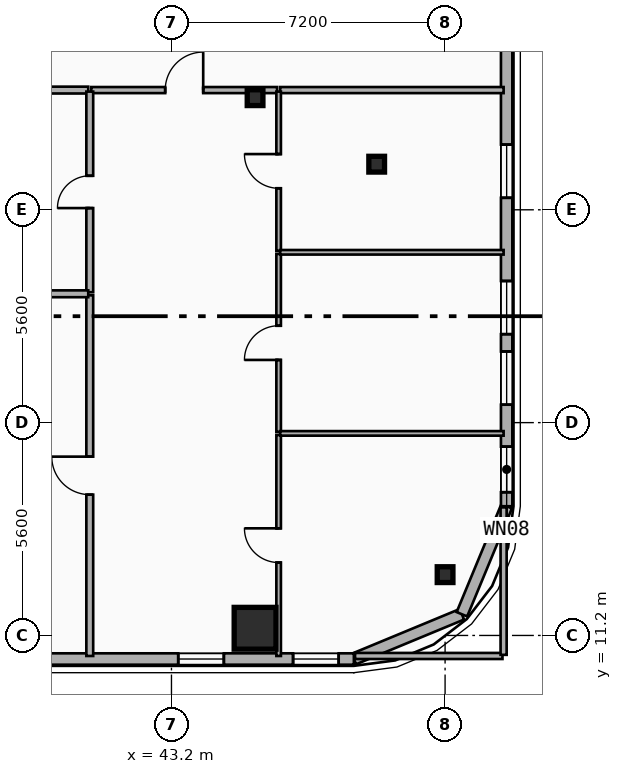
"""IFC4 building model, lengths in metres.
Left out: names, types, materials, properties, quantities, classifications, styles, units other than length and angle.
Written with IfcOpenShell. Run it as: python <this file> out.ifc"""

import sys

from ifc_helpers import new_model, si_unit, direction, frame, frame_2d, origin, origin_2d, place, context, subcontext, project, spatial, rectangle, i_section, extrude, element, fill, save


model = new_model("IFC4")
c1 = context("Model", 3, precision=1e-05, world=origin(), true_north=direction((0.0, 1.0)))
c2 = subcontext(c1, "Body", "Model", "MODEL_VIEW")
j1 = project(units=[si_unit("LENGTHUNIT", "METRE"), si_unit("PLANEANGLEUNIT", "RADIAN")], contexts=[c1])
p1 = place(None, origin())
s1 = spatial("IfcSite", under=j1, at=p1, CompositionType="ELEMENT")
p2 = place(p1, origin())
s2 = spatial("IfcBuilding", under=s1, at=p2, CompositionType="ELEMENT")
p3 = place(p2, frame((0.0, 0.0, 162.55)))
s3 = spatial("IfcBuildingStorey", under=s2, at=p3, CompositionType="ELEMENT", Elevation=162.55)
p4 = place(p3, frame((45.4, 25.35, 0.0), z_axis=(0.0, 0.0, 1.0), x_axis=(1.0, 0.0, 0.0)))
e1 = element("IfcColumn", 1, at=p4, inside=s3, PredefinedType="COLUMN", context=c2, shape_type="SweptSolid", body=[
    extrude(i_section(OverallWidth=0.413, OverallDepth=0.415, WebThickness=0.03, FlangeThickness=0.047, FilletRadius=0.015, at=origin_2d()), origin(), (0.0, 0.0, 1.0), 3.55),
])
p5 = place(p3, frame((45.4, 11.498, 0.0), z_axis=(0.0, -0.0902702026, 0.995917311087), x_axis=(1.0, 0.0, 0.0)))
e2 = element("IfcColumn", 2, at=p5, inside=s3, PredefinedType="COLUMN", context=c2, shape_type="SweptSolid", body=[
    extrude(rectangle(XDim=1.1, YDim=1.1, at=origin_2d()), origin(), (0.0, 0.0, 1.0), 3.565),
])
p6 = place(p3, frame((48.6, 23.6, 0.0), z_axis=(0.0, 0.0, 1.0), x_axis=(1.0, 0.0, 0.0)))
e3 = element("IfcColumn", 3, at=p6, inside=s3, PredefinedType="COLUMN", context=c2, shape_type="SweptSolid", body=[
    extrude(i_section(OverallWidth=0.413, OverallDepth=0.415, WebThickness=0.03, FlangeThickness=0.047, FilletRadius=0.015, at=origin_2d()), origin(), (0.0, 0.0, 1.0), 3.55),
])
p7 = place(p3, frame((50.4, 12.896, 0.0), z_axis=(0.0, -0.079862380324, 0.996805898964), x_axis=(1.0, 0.0, 0.0)))
e4 = element("IfcColumn", 4, at=p7, inside=s3, PredefinedType="COLUMN", context=c2, shape_type="SweptSolid", body=[
    extrude(i_section(OverallWidth=0.413, OverallDepth=0.415, WebThickness=0.03, FlangeThickness=0.047, FilletRadius=0.015, at=origin_2d()), origin(), (0.0, 0.0, 1.0), 3.562),
])
p8 = place(p3, frame((50.843, 11.757, 0.0), z_axis=(0.0, 0.0, 1.0), x_axis=(-0.92389884758, -0.382636798336, 0.0)))
e5 = element("IfcWall", 5, at=p8, inside=s3, PredefinedType="SOLIDWALL", context=c2, shape_type="SweptSolid", body=[
    extrude(rectangle(XDim=3.077, YDim=0.3, at=frame_2d((1.538, 0.0))), origin(), (0.0, 0.0, 1.0), 3.29),
])
p9 = place(p3, frame((52.02, 14.6, 0.0), z_axis=(0.0, 0.0, 1.0), x_axis=(-0.382676475685, -0.923882414032, 0.0)))
e6 = element("IfcWall", 6, at=p9, inside=s3, PredefinedType="SOLIDWALL", context=c2, shape_type="SweptSolid", body=[
    extrude(rectangle(XDim=3.077, YDim=0.3, at=frame_2d((1.539, 0.0))), origin(), (0.0, 0.0, 1.0), 3.29),
])
p10 = place(p3, frame((52.02, 37.6, 0.0), z_axis=(0.0, 0.0, 1.0), x_axis=(0.0, -1.0, 0.0)))
e7 = element("IfcWall", 7, at=p10, inside=s3, PredefinedType="SOLIDWALL", context=c2, shape_type="SweptSolid", body=[
    extrude(rectangle(XDim=23.0, YDim=0.3, at=frame_2d((11.5, 0.0))), origin(), (0.0, 0.0, 1.0), 3.29),
])
p11 = place(p10, frame((2.513, 0.0, 0.34)))
e8 = element("IfcOpeningElement", 8, at=p11, cuts=e7, PredefinedType="OPENING", context=c2, shape_type="SweptSolid", body=[
    extrude(rectangle(XDim=1.4, YDim=2.1, at=frame_2d((0.7, 1.05))), frame((0.0, 0.16, 0.0), z_axis=(0.0, -1.0, 0.0), x_axis=(1.0, 0.0, 0.0)), (0.0, 0.0, 1.0), 0.32),
])
p12 = place(p10, frame((6.107, 0.0, 0.34)))
e9 = element("IfcOpeningElement", 9, at=p12, cuts=e7, PredefinedType="OPENING", context=c2, shape_type="SweptSolid", body=[
    extrude(rectangle(XDim=1.4, YDim=2.1, at=frame_2d((0.7, 1.05))), frame((0.0, 0.16, 0.0), z_axis=(0.0, -1.0, 0.0), x_axis=(1.0, 0.0, 0.0)), (0.0, 0.0, 1.0), 0.32),
])
p13 = place(p10, frame((21.431, 0.0, 0.68)))
e10 = element("IfcOpeningElement", 10, at=p13, cuts=e7, PredefinedType="OPENING", context=c2, shape_type="SweptSolid", body=[
    extrude(rectangle(XDim=1.2, YDim=1.5, at=frame_2d((0.6, 0.75))), frame((0.0, 0.16, 0.0), z_axis=(0.0, -1.0, 0.0), x_axis=(1.0, 0.0, 0.0)), (0.0, 0.0, 1.0), 0.32),
])
p14 = place(p10, frame((17.073, 0.0, 0.34)))
e11 = element("IfcOpeningElement", 11, at=p14, cuts=e7, PredefinedType="OPENING", context=c2, shape_type="SweptSolid", body=[
    extrude(rectangle(XDim=1.4, YDim=2.1, at=frame_2d((0.7, 1.05))), frame((0.0, 0.16, 0.0), z_axis=(0.0, -1.0, 0.0), x_axis=(1.0, 0.0, 0.0)), (0.0, 0.0, 1.0), 0.32),
])
p15 = place(p10, frame((18.928, 0.0, 0.34)))
e12 = element("IfcOpeningElement", 12, at=p15, cuts=e7, PredefinedType="OPENING", context=c2, shape_type="SweptSolid", body=[
    extrude(rectangle(XDim=1.4, YDim=2.1, at=frame_2d((0.7, 1.05))), frame((0.0, 0.16, 0.0), z_axis=(0.0, -1.0, 0.0), x_axis=(1.0, 0.0, 0.0)), (0.0, 0.0, 1.0), 0.32),
])
p16 = place(p10, frame((13.484, 0.0, 0.34)))
e13 = element("IfcOpeningElement", 13, at=p16, cuts=e7, PredefinedType="OPENING", context=c2, shape_type="SweptSolid", body=[
    extrude(rectangle(XDim=1.4, YDim=2.1, at=frame_2d((0.7, 1.05))), frame((0.0, 0.16, 0.0), z_axis=(0.0, -1.0, 0.0), x_axis=(1.0, 0.0, 0.0)), (0.0, 0.0, 1.0), 0.32),
])
p17 = place(p3, frame((48.0, 10.58, 0.0), z_axis=(0.0, 0.0, 1.0), x_axis=(-1.0, 0.0, 0.0)))
e14 = element("IfcWall", 14, at=p17, inside=s3, PredefinedType="SOLIDWALL", context=c2, shape_type="SweptSolid", body=[
    extrude(rectangle(XDim=38.4, YDim=0.3, at=frame_2d((19.2, 0.0))), origin(), (0.0, 0.0, 1.0), 3.29),
])
p18 = place(p17, frame((36.651, 0.0, 0.75)))
e15 = element("IfcOpeningElement", 15, at=p18, cuts=e14, PredefinedType="OPENING", context=c2, shape_type="SweptSolid", body=[
    extrude(rectangle(XDim=1.4, YDim=1.8, at=frame_2d((0.7, 0.9))), frame((0.0, 0.16, 0.0), z_axis=(0.0, -1.0, 0.0), x_axis=(1.0, 0.0, 0.0)), (0.0, 0.0, 1.0), 0.32),
])
p19 = place(p17, frame((33.778, 0.0, 1.22)))
e16 = element("IfcOpeningElement", 16, at=p19, cuts=e14, PredefinedType="OPENING", context=c2, shape_type="SweptSolid", body=[
    extrude(rectangle(XDim=1.2, YDim=1.5, at=frame_2d((0.6, 0.75))), frame((0.0, 0.16, 0.0), z_axis=(0.0, -1.0, 0.0), x_axis=(1.0, 0.0, 0.0)), (0.0, 0.0, 1.0), 0.32),
])
p20 = place(p17, frame((27.522, 0.0, 0.65)))
e17 = element("IfcOpeningElement", 17, at=p20, cuts=e14, PredefinedType="OPENING", context=c2, shape_type="SweptSolid", body=[
    extrude(rectangle(XDim=1.2, YDim=1.5, at=frame_2d((0.6, 0.75))), frame((0.0, 0.16, 0.0), z_axis=(0.0, -1.0, 0.0), x_axis=(1.0, 0.0, 0.0)), (0.0, 0.0, 1.0), 0.32),
])
p21 = place(p17, frame((15.464, 0.0, 0.65)))
e18 = element("IfcOpeningElement", 18, at=p21, cuts=e14, PredefinedType="OPENING", context=c2, shape_type="SweptSolid", body=[
    extrude(rectangle(XDim=2.1, YDim=2.1, at=frame_2d((1.05, 1.05))), frame((0.0, 0.16, 0.0), z_axis=(0.0, -1.0, 0.0), x_axis=(1.0, 0.0, 0.0)), (0.0, 0.0, 1.0), 0.32),
])
p22 = place(p17, frame((22.175, 0.0, 0.65)))
e19 = element("IfcOpeningElement", 19, at=p22, cuts=e14, PredefinedType="OPENING", context=c2, shape_type="SweptSolid", body=[
    extrude(rectangle(XDim=2.1, YDim=2.1, at=frame_2d((1.05, 1.05))), frame((0.0, 0.16, 0.0), z_axis=(0.0, -1.0, 0.0), x_axis=(1.0, 0.0, 0.0)), (0.0, 0.0, 1.0), 0.32),
])
p23 = place(p17, frame((12.561, 0.0, 0.75)))
e20 = element("IfcOpeningElement", 20, at=p23, cuts=e14, PredefinedType="OPENING", context=c2, shape_type="SweptSolid", body=[
    extrude(rectangle(XDim=1.4, YDim=1.8, at=frame_2d((0.7, 0.9))), frame((0.0, 0.16, 0.0), z_axis=(0.0, -1.0, 0.0), x_axis=(1.0, 0.0, 0.0)), (0.0, 0.0, 1.0), 0.32),
])
p24 = place(p17, frame((3.422, 0.0, 0.65)))
e21 = element("IfcOpeningElement", 21, at=p24, cuts=e14, PredefinedType="OPENING", context=c2, shape_type="SweptSolid", body=[
    extrude(rectangle(XDim=1.2, YDim=1.5, at=frame_2d((0.6, 0.75))), frame((0.0, 0.16, 0.0), z_axis=(0.0, -1.0, 0.0), x_axis=(1.0, 0.0, 0.0)), (0.0, 0.0, 1.0), 0.32),
])
p25 = place(p17, frame((8.25, 0.0, 1.68)))
e22 = element("IfcOpeningElement", 22, at=p25, cuts=e14, PredefinedType="OPENING", context=c2, shape_type="SweptSolid", body=[
    extrude(rectangle(XDim=1.1, YDim=1.05, at=frame_2d((0.55, 0.525))), frame((0.0, 0.16, 0.0), z_axis=(0.0, -1.0, 0.0), x_axis=(1.0, 0.0, 0.0)), (0.0, 0.0, 1.0), 0.32),
])
p26 = place(p17, frame((0.4, 0.0, 0.68)))
e23 = element("IfcOpeningElement", 23, at=p26, cuts=e14, PredefinedType="OPENING", context=c2, shape_type="SweptSolid", body=[
    extrude(rectangle(XDim=1.2, YDim=1.5, at=frame_2d((0.6, 0.75))), frame((0.0, 0.16, 0.0), z_axis=(0.0, -1.0, 0.0), x_axis=(1.0, 0.0, 0.0)), (0.0, 0.0, 1.0), 0.32),
])
p27 = place(p3, frame((41.09, 25.55, 0.0), z_axis=(0.0, 0.0, 1.0), x_axis=(1.0, 0.0, 0.0)))
e24 = element("IfcWall", 24, at=p27, inside=s3, PredefinedType="PARTITIONING", context=c2, shape_type="SweptSolid", body=[
    extrude(rectangle(XDim=4.89, YDim=0.16, at=frame_2d((2.445, 0.0))), origin(), (0.0, 0.0, 1.0), 2.36),
])
p28 = place(p27, frame((1.945, 0.0, 0.0)))
e25 = element("IfcOpeningElement", 25, at=p28, cuts=e24, PredefinedType="OPENING", context=c2, shape_type="SweptSolid", body=[
    extrude(rectangle(XDim=1.0, YDim=2.15, at=frame_2d((0.5, 1.075))), frame((0.0, 0.09, 0.0), z_axis=(0.0, -1.0, 0.0), x_axis=(1.0, 0.0, 0.0)), (0.0, 0.0, 1.0), 0.18),
])
p29 = place(p3, frame((38.39, 25.55, 0.0), z_axis=(0.0, 0.0, 1.0), x_axis=(1.0, 0.0, 0.0)))
e26 = element("IfcWall", 26, at=p29, inside=s3, PredefinedType="PLUMBINGWALL", context=c2, shape_type="SweptSolid", body=[
    extrude(rectangle(XDim=2.62, YDim=0.18, at=frame_2d((1.31, 0.0))), origin(), (0.0, 0.0, 1.0), 3.29),
])
p30 = place(p3, frame((46.06, 25.55, 0.0), z_axis=(0.0, 0.0, 1.0), x_axis=(1.0, 0.0, 0.0)))
e27 = element("IfcWall", 27, at=p30, inside=s3, PredefinedType="PARTITIONING", context=c2, shape_type="SweptSolid", body=[
    extrude(rectangle(XDim=5.88, YDim=0.16, at=frame_2d((2.94, 0.0))), origin(), (0.0, 0.0, 1.0), 2.62),
])
p31 = place(p3, frame((41.05, 10.66, 0.0), z_axis=(0.0, 0.0, 1.0), x_axis=(0.0, 1.0, 0.0)))
e28 = element("IfcWall", 28, at=p31, inside=s3, PredefinedType="PLUMBINGWALL", context=c2, shape_type="SweptSolid", body=[
    extrude(rectangle(XDim=9.49, YDim=0.18, at=frame_2d((4.745, 0.0))), origin(), (0.0, 0.0, 1.0), 2.87),
])
p32 = place(p31, frame((4.245, 0.0, 0.0)))
e29 = element("IfcOpeningElement", 29, at=p32, cuts=e28, PredefinedType="OPENING", context=c2, shape_type="SweptSolid", body=[
    extrude(rectangle(XDim=1.0, YDim=2.15, at=frame_2d((0.5, 1.075))), frame((0.0, 0.1, 0.0), z_axis=(0.0, -1.0, 0.0), x_axis=(1.0, 0.0, 0.0)), (0.0, 0.0, 1.0), 0.2),
])
p33 = place(p3, frame((41.05, 20.23, 0.0), z_axis=(0.0, 0.0, 1.0), x_axis=(0.0, 1.0, 0.0)))
e30 = element("IfcWall", 30, at=p33, inside=s3, PredefinedType="PLUMBINGWALL", context=c2, shape_type="SweptSolid", body=[
    extrude(rectangle(XDim=5.28, YDim=0.18, at=frame_2d((2.64, 0.0))), origin(), (0.0, 0.0, 1.0), 2.87),
])
p34 = place(p33, frame((2.215, 0.0, 0.0)))
e31 = element("IfcOpeningElement", 31, at=p34, cuts=e30, PredefinedType="OPENING", context=c2, shape_type="SweptSolid", body=[
    extrude(rectangle(XDim=0.85, YDim=2.1, at=frame_2d((0.425, 1.05))), frame((0.0, 0.1, 0.0), z_axis=(0.0, -1.0, 0.0), x_axis=(1.0, 0.0, 0.0)), (0.0, 0.0, 1.0), 0.2),
])
p35 = place(p3, frame((46.02, 10.66, 0.0), z_axis=(0.0, 0.0, 1.0), x_axis=(0.0, 1.0, 0.0)))
e32 = element("IfcWall", 32, at=p35, inside=s3, PredefinedType="PARTITIONING", context=c2, shape_type="SweptSolid", body=[
    extrude(rectangle(XDim=5.817, YDim=0.12, at=frame_2d((2.909, 0.0))), origin(), (0.0, 0.0, 1.0), 2.91),
])
p36 = place(p35, frame((2.458, 0.0, 0.0)))
e33 = element("IfcOpeningElement", 33, at=p36, cuts=e32, PredefinedType="OPENING", context=c2, shape_type="SweptSolid", body=[
    extrude(rectangle(XDim=0.9, YDim=2.1, at=frame_2d((0.45, 1.05))), frame((0.0, 0.07, 0.0), z_axis=(0.0, -1.0, 0.0), x_axis=(1.0, 0.0, 0.0)), (0.0, 0.0, 1.0), 0.14),
])
p37 = place(p3, frame((46.02, 16.557, 0.0), z_axis=(0.0, 0.0, 1.0), x_axis=(0.0, 1.0, 0.0)))
e34 = element("IfcWall", 34, at=p37, inside=s3, PredefinedType="PARTITIONING", context=c2, shape_type="SweptSolid", body=[
    extrude(rectangle(XDim=4.685, YDim=0.12, at=frame_2d((2.343, 0.0))), origin(), (0.0, 0.0, 1.0), 2.91),
])
p38 = place(p37, frame((1.893, 0.0, 0.0)))
e35 = element("IfcOpeningElement", 35, at=p38, cuts=e34, PredefinedType="OPENING", context=c2, shape_type="SweptSolid", body=[
    extrude(rectangle(XDim=0.9, YDim=2.1, at=frame_2d((0.45, 1.05))), frame((0.0, 0.07, 0.0), z_axis=(0.0, -1.0, 0.0), x_axis=(1.0, 0.0, 0.0)), (0.0, 0.0, 1.0), 0.14),
])
p39 = place(p3, frame((46.02, 21.322, 0.0), z_axis=(0.0, 0.0, 1.0), x_axis=(0.0, 1.0, 0.0)))
e36 = element("IfcWall", 36, at=p39, inside=s3, PredefinedType="PARTITIONING", context=c2, shape_type="SweptSolid", body=[
    extrude(rectangle(XDim=4.188, YDim=0.12, at=frame_2d((2.094, 0.0))), origin(), (0.0, 0.0, 1.0), 2.77),
])
p40 = place(p39, frame((1.644, 0.0, 0.0)))
e37 = element("IfcOpeningElement", 37, at=p40, cuts=e36, PredefinedType="OPENING", context=c2, shape_type="SweptSolid", body=[
    extrude(rectangle(XDim=0.9, YDim=2.1, at=frame_2d((0.45, 1.05))), frame((0.0, 0.07, 0.0), z_axis=(0.0, -1.0, 0.0), x_axis=(1.0, 0.0, 0.0)), (0.0, 0.0, 1.0), 0.14),
])
p41 = place(p3, frame((38.39, 20.19, 0.0), z_axis=(0.0, 0.0, 1.0), x_axis=(1.0, 0.0, 0.0)))
e38 = element("IfcWall", 38, at=p41, inside=s3, PredefinedType="PLUMBINGWALL", context=c2, shape_type="SweptSolid", body=[
    extrude(rectangle(XDim=2.62, YDim=0.18, at=frame_2d((1.31, 0.0))), origin(), (0.0, 0.0, 1.0), 3.29),
])
for number, where, z_axis, x_axis in (
    (39, (46.06, 16.517, 0.0), (0.0, 0.0, 1.0), (1.0, 0.0, 0.0)),
    (40, (46.06, 21.282, 0.0), (0.0, 0.0, 1.0), (1.0, 0.0, 0.0)),
):
    element("IfcWall", number, at=place(p3, frame(where, z_axis=z_axis, x_axis=x_axis)), inside=s3, PredefinedType="PARTITIONING", context=c2, shape_type="SweptSolid", body=[
        extrude(rectangle(XDim=5.88, YDim=0.12, at=frame_2d((2.94, 0.0))), origin(), (0.0, 0.0, 1.0), 2.62),
    ])
p42 = place(p3, frame((48.03, 10.66, 0.0), z_axis=(0.0, 0.0, 1.0), x_axis=(1.0, 0.0, 0.0)))
e41 = element("IfcWall", 41, at=p42, inside=s3, PredefinedType="PARTITIONING", context=c2, shape_type="SweptSolid", body=[
    extrude(rectangle(XDim=3.88, YDim=0.16, at=frame_2d((1.94, 0.0))), origin(), (0.0, 0.0, 1.0), 3.29),
])
p43 = place(p3, frame((51.94, 10.69, 0.0), z_axis=(0.0, 0.0, 1.0), x_axis=(0.0, 1.0, 0.0)))
e42 = element("IfcWall", 42, at=p43, inside=s3, PredefinedType="PARTITIONING", context=c2, shape_type="SweptSolid", body=[
    extrude(rectangle(XDim=3.88, YDim=0.16, at=frame_2d((1.94, 0.0))), origin(), (0.0, 0.0, 1.0), 3.29),
])
p44 = place(p13, origin())
e43 = element("IfcWindow", 43, at=p44, inside=s3, PartitioningType="SINGLE_PANEL", PredefinedType="WINDOW", context=c2, shape_type="SweptSolid", body=[
    extrude(rectangle(XDim=1.2, YDim=1.5, at=frame_2d((0.6, 0.75))), frame((0.0, 0.03, 0.0), z_axis=(0.0, -1.0, 0.0), x_axis=(1.0, 0.0, 0.0)), (0.0, 0.0, 1.0), 0.06),
])
fill(e10, e43)
p45 = place(p14, origin())
e44 = element("IfcWindow", 44, at=p45, inside=s3, PartitioningType="SINGLE_PANEL", PredefinedType="WINDOW", context=c2, shape_type="SweptSolid", body=[
    extrude(rectangle(XDim=1.4, YDim=2.1, at=frame_2d((0.7, 1.05))), frame((0.0, 0.03, 0.0), z_axis=(0.0, -1.0, 0.0), x_axis=(1.0, 0.0, 0.0)), (0.0, 0.0, 1.0), 0.06),
])
fill(e11, e44)
p46 = place(p15, origin())
e45 = element("IfcWindow", 45, at=p46, inside=s3, PartitioningType="SINGLE_PANEL", PredefinedType="WINDOW", context=c2, shape_type="SweptSolid", body=[
    extrude(rectangle(XDim=1.4, YDim=2.1, at=frame_2d((0.7, 1.05))), frame((0.0, 0.03, 0.0), z_axis=(0.0, -1.0, 0.0), x_axis=(1.0, 0.0, 0.0)), (0.0, 0.0, 1.0), 0.06),
])
fill(e12, e45)
p47 = place(p16, origin())
e46 = element("IfcWindow", 46, at=p47, inside=s3, PartitioningType="SINGLE_PANEL", PredefinedType="WINDOW", context=c2, shape_type="SweptSolid", body=[
    extrude(rectangle(XDim=1.4, YDim=2.1, at=frame_2d((0.7, 1.05))), frame((0.0, 0.03, 0.0), z_axis=(0.0, -1.0, 0.0), x_axis=(1.0, 0.0, 0.0)), (0.0, 0.0, 1.0), 0.06),
])
fill(e13, e46)
p48 = place(p24, origin())
e47 = element("IfcWindow", 47, at=p48, inside=s3, PartitioningType="SINGLE_PANEL", PredefinedType="WINDOW", context=c2, shape_type="SweptSolid", body=[
    extrude(rectangle(XDim=1.2, YDim=1.5, at=frame_2d((0.6, 0.75))), frame((0.0, 0.03, 0.0), z_axis=(0.0, -1.0, 0.0), x_axis=(1.0, 0.0, 0.0)), (0.0, 0.0, 1.0), 0.06),
])
fill(e21, e47)
p49 = place(p26, origin())
e48 = element("IfcWindow", 48, at=p49, inside=s3, PartitioningType="SINGLE_PANEL", PredefinedType="WINDOW", context=c2, shape_type="SweptSolid", body=[
    extrude(rectangle(XDim=1.2, YDim=1.5, at=frame_2d((0.6, 0.75))), frame((0.0, 0.03, 0.0), z_axis=(0.0, -1.0, 0.0), x_axis=(1.0, 0.0, 0.0)), (0.0, 0.0, 1.0), 0.06),
])
fill(e23, e48)
p50 = place(p28, origin())
e49 = element("IfcDoor", 49, at=p50, inside=s3, OperationType="SINGLE_SWING_RIGHT", PredefinedType="DOOR", context=c2, shape_type="SweptSolid", body=[
    extrude(rectangle(XDim=1.0, YDim=2.15, at=frame_2d((0.5, 1.075))), frame((0.0, 0.025, 0.0), z_axis=(0.0, -1.0, 0.0), x_axis=(1.0, 0.0, 0.0)), (0.0, 0.0, 1.0), 0.05),
])
fill(e25, e49)
p51 = place(p32, origin())
e50 = element("IfcDoor", 50, at=p51, inside=s3, OperationType="SINGLE_SWING_RIGHT", PredefinedType="DOOR", context=c2, shape_type="SweptSolid", body=[
    extrude(rectangle(XDim=1.0, YDim=2.15, at=frame_2d((0.5, 1.075))), frame((0.0, 0.025, 0.0), z_axis=(0.0, -1.0, 0.0), x_axis=(1.0, 0.0, 0.0)), (0.0, 0.0, 1.0), 0.05),
])
fill(e29, e50)
p52 = place(p34, origin())
e51 = element("IfcDoor", 51, at=p52, inside=s3, OperationType="SINGLE_SWING_LEFT", PredefinedType="DOOR", context=c2, shape_type="SweptSolid", body=[
    extrude(rectangle(XDim=0.85, YDim=2.1, at=frame_2d((0.425, 1.05))), frame((0.0, 0.025, 0.0), z_axis=(0.0, -1.0, 0.0), x_axis=(1.0, 0.0, 0.0)), (0.0, 0.0, 1.0), 0.05),
])
fill(e31, e51)
p53 = place(p36, origin())
e52 = element("IfcDoor", 52, at=p53, inside=s3, OperationType="SINGLE_SWING_RIGHT", PredefinedType="DOOR", context=c2, shape_type="SweptSolid", body=[
    extrude(rectangle(XDim=0.9, YDim=2.1, at=frame_2d((0.45, 1.05))), frame((0.0, 0.025, 0.0), z_axis=(0.0, -1.0, 0.0), x_axis=(1.0, 0.0, 0.0)), (0.0, 0.0, 1.0), 0.05),
])
fill(e33, e52)
p54 = place(p38, origin())
e53 = element("IfcDoor", 53, at=p54, inside=s3, OperationType="SINGLE_SWING_LEFT", PredefinedType="DOOR", context=c2, shape_type="SweptSolid", body=[
    extrude(rectangle(XDim=0.9, YDim=2.1, at=frame_2d((0.45, 1.05))), frame((0.0, 0.025, 0.0), z_axis=(0.0, -1.0, 0.0), x_axis=(1.0, 0.0, 0.0)), (0.0, 0.0, 1.0), 0.05),
])
fill(e35, e53)
p55 = place(p40, origin())
e54 = element("IfcDoor", 54, at=p55, inside=s3, OperationType="SINGLE_SWING_RIGHT", PredefinedType="DOOR", context=c2, shape_type="SweptSolid", body=[
    extrude(rectangle(XDim=0.9, YDim=2.1, at=frame_2d((0.45, 1.05))), frame((0.0, 0.025, 0.0), z_axis=(0.0, -1.0, 0.0), x_axis=(1.0, 0.0, 0.0)), (0.0, 0.0, 1.0), 0.05),
])
fill(e37, e54)
save(model, sys.argv[1])
